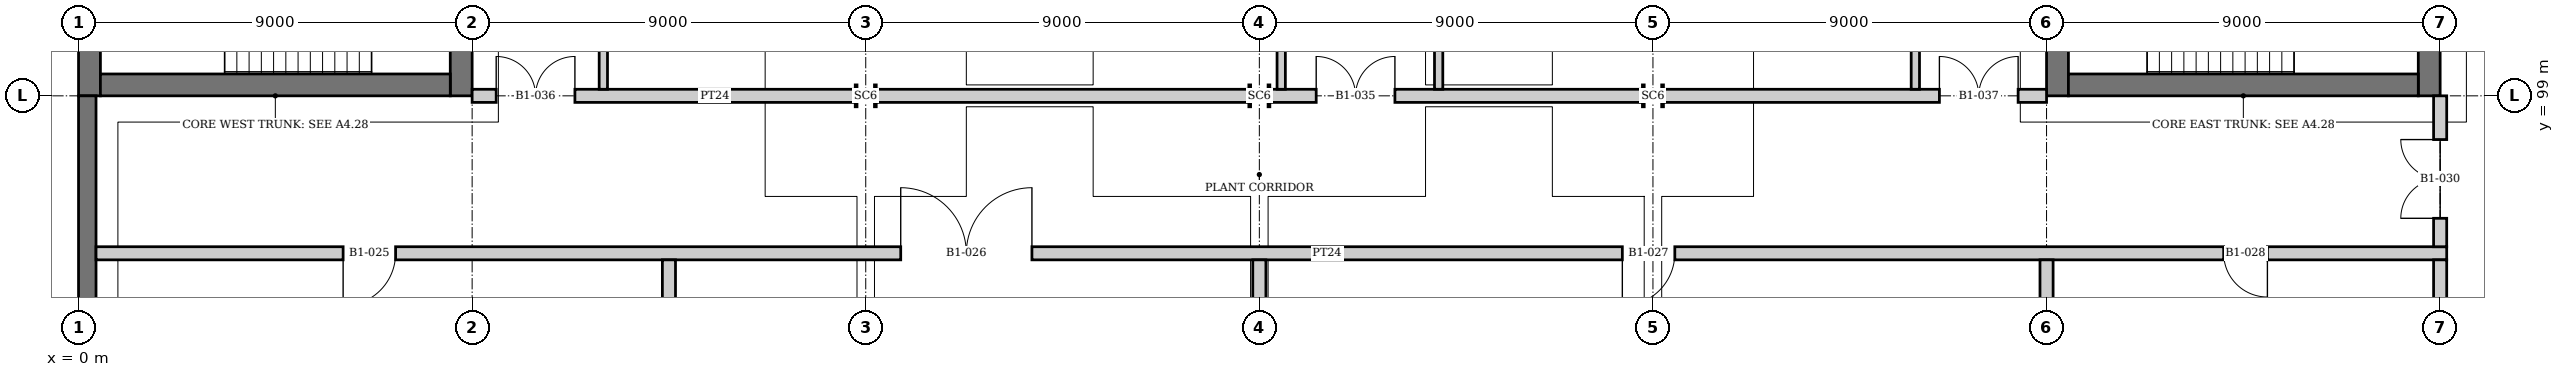
"""IFC4 building model, lengths in metres.
Left out: names, types, materials, properties, quantities, classifications, styles, units other than length and angle.
Written with IfcOpenShell. Run it as: python <this file> out.ifc"""

import sys

from ifc_helpers import new_model, si_unit, direction, frame, frame_2d, origin, origin_2d, place, context, subcontext, project, spatial, rectangle, i_section, extrude, element, fill, save


model = new_model("IFC4")
c1 = context("Model", 3, precision=1e-05, world=origin(), true_north=direction((0.0, 1.0)))
c2 = subcontext(c1, "Body", "Model", "MODEL_VIEW")
j1 = project(units=[si_unit("LENGTHUNIT", "METRE"), si_unit("PLANEANGLEUNIT", "RADIAN")], contexts=[c1])
p1 = place(None, origin())
s1 = spatial("IfcSite", under=j1, at=p1, CompositionType="ELEMENT")
p2 = place(p1, origin())
s2 = spatial("IfcBuilding", under=s1, at=p2, CompositionType="ELEMENT")
p3 = place(p2, frame((0.0, 0.0, -4.5)))
s3 = spatial("IfcBuildingStorey", under=s2, at=p3, CompositionType="ELEMENT", Elevation=-4.5)
for number, where, z_axis, x_axis in (
    (1, (18.0, 99.0, 0.0), (0.0, 0.0, 1.0), (0.0, 1.0, 0.0)),
    (2, (27.0, 99.0, 0.0), (0.0, 0.0, 1.0), (0.0, 1.0, 0.0)),
    (3, (36.0, 99.0, 0.0), (0.0, 0.0, 1.0), (0.0, 1.0, 0.0)),
):
    element("IfcColumn", number, at=place(p3, frame(where, z_axis=z_axis, x_axis=x_axis)), inside=s3, PredefinedType="COLUMN", context=c2, shape_type="SweptSolid", body=[
        extrude(i_section(OverallWidth=0.5, OverallDepth=0.48, WebThickness=0.04, FlangeThickness=0.04, at=origin_2d()), origin(), (0.0, 0.0, 1.0), 4.5),
    ])
p4 = place(p3, frame((0.25, 99.0, 0.0), z_axis=(0.0, 0.0, 1.0), x_axis=(0.0, 1.0, 0.0)))
e4 = element("IfcWall", 4, at=p4, inside=s3, PredefinedType="SHEAR", context=c2, shape_type="SweptSolid", body=[
    extrude(rectangle(XDim=18.0, YDim=0.5, at=frame_2d((9.0, 0.0))), origin(), (0.0, 0.0, 1.0), 4.5),
])
p5 = place(p3, frame((8.75, 99.0, 0.0), z_axis=(0.0, 0.0, 1.0), x_axis=(0.0, 1.0, 0.0)))
e5 = element("IfcWall", 5, at=p5, inside=s3, PredefinedType="SHEAR", context=c2, shape_type="SweptSolid", body=[
    extrude(rectangle(XDim=18.0, YDim=0.5, at=frame_2d((9.0, 0.0))), origin(), (0.0, 0.0, 1.0), 4.5),
])
p6 = place(p5, frame((1.5, 0.0, 0.0)))
e6 = element("IfcOpeningElement", 6, at=p6, cuts=e5, PredefinedType="OPENING", context=c2, shape_type="SweptSolid", body=[
    extrude(rectangle(XDim=1.8, YDim=2.1, at=frame_2d((0.9, 1.05))), frame((0.0, 0.26, 0.0), z_axis=(0.0, -1.0, 0.0), x_axis=(1.0, 0.0, 0.0)), (0.0, 0.0, 1.0), 0.52),
])
p7 = place(p5, frame((14.7, 0.0, 0.0)))
e7 = element("IfcOpeningElement", 7, at=p7, cuts=e5, PredefinedType="OPENING", context=c2, shape_type="SweptSolid", body=[
    extrude(rectangle(XDim=1.8, YDim=2.1, at=frame_2d((0.9, 1.05))), frame((0.0, 0.26, 0.0), z_axis=(0.0, -1.0, 0.0), x_axis=(1.0, 0.0, 0.0)), (0.0, 0.0, 1.0), 0.52),
])
p8 = place(p5, frame((7.5, 0.0, 0.0)))
e8 = element("IfcOpeningElement", 8, at=p8, cuts=e5, PredefinedType="OPENING", context=c2, shape_type="SweptSolid", body=[
    extrude(rectangle(XDim=1.8, YDim=2.1, at=frame_2d((0.9, 1.05))), frame((0.0, 0.26, 0.0), z_axis=(0.0, -1.0, 0.0), x_axis=(1.0, 0.0, 0.0)), (0.0, 0.0, 1.0), 0.52),
])
p9 = place(p3, frame((0.5, 99.25, 0.0), z_axis=(0.0, 0.0, 1.0), x_axis=(1.0, 0.0, 0.0)))
e9 = element("IfcWall", 9, at=p9, inside=s3, PredefinedType="SHEAR", context=c2, shape_type="SweptSolid", body=[
    extrude(rectangle(XDim=8.0, YDim=0.5, at=frame_2d((4.0, 0.0))), origin(), (0.0, 0.0, 1.0), 4.5),
])
p10 = place(p3, frame((45.25, 99.0, 0.0), z_axis=(0.0, 0.0, 1.0), x_axis=(0.0, 1.0, 0.0)))
e10 = element("IfcWall", 10, at=p10, inside=s3, PredefinedType="SHEAR", context=c2, shape_type="SweptSolid", body=[
    extrude(rectangle(XDim=18.0, YDim=0.5, at=frame_2d((9.0, 0.0))), origin(), (0.0, 0.0, 1.0), 4.5),
])
p11 = place(p10, frame((1.5, 0.0, 0.0)))
e11 = element("IfcOpeningElement", 11, at=p11, cuts=e10, PredefinedType="OPENING", context=c2, shape_type="SweptSolid", body=[
    extrude(rectangle(XDim=1.8, YDim=2.1, at=frame_2d((0.9, 1.05))), frame((0.0, 0.26, 0.0), z_axis=(0.0, -1.0, 0.0), x_axis=(1.0, 0.0, 0.0)), (0.0, 0.0, 1.0), 0.52),
])
p12 = place(p10, frame((14.7, 0.0, 0.0)))
e12 = element("IfcOpeningElement", 12, at=p12, cuts=e10, PredefinedType="OPENING", context=c2, shape_type="SweptSolid", body=[
    extrude(rectangle(XDim=1.8, YDim=2.1, at=frame_2d((0.9, 1.05))), frame((0.0, 0.26, 0.0), z_axis=(0.0, -1.0, 0.0), x_axis=(1.0, 0.0, 0.0)), (0.0, 0.0, 1.0), 0.52),
])
p13 = place(p10, frame((7.5, 0.0, 0.0)))
e13 = element("IfcOpeningElement", 13, at=p13, cuts=e10, PredefinedType="OPENING", context=c2, shape_type="SweptSolid", body=[
    extrude(rectangle(XDim=1.8, YDim=2.1, at=frame_2d((0.9, 1.05))), frame((0.0, 0.26, 0.0), z_axis=(0.0, -1.0, 0.0), x_axis=(1.0, 0.0, 0.0)), (0.0, 0.0, 1.0), 0.52),
])
p14 = place(p3, frame((53.75, 99.0, 0.0), z_axis=(0.0, 0.0, 1.0), x_axis=(0.0, 1.0, 0.0)))
e14 = element("IfcWall", 14, at=p14, inside=s3, PredefinedType="SHEAR", context=c2, shape_type="SweptSolid", body=[
    extrude(rectangle(XDim=18.0, YDim=0.5, at=frame_2d((9.0, 0.0))), origin(), (0.0, 0.0, 1.0), 4.5),
])
p15 = place(p3, frame((45.5, 99.25, 0.0), z_axis=(0.0, 0.0, 1.0), x_axis=(1.0, 0.0, 0.0)))
e15 = element("IfcWall", 15, at=p15, inside=s3, PredefinedType="SHEAR", context=c2, shape_type="SweptSolid", body=[
    extrude(rectangle(XDim=8.0, YDim=0.5, at=frame_2d((4.0, 0.0))), origin(), (0.0, 0.0, 1.0), 4.5),
])
p16 = place(p3, frame((0.2, 90.008, 0.0), z_axis=(0.0, 0.0, 1.0), x_axis=(0.0, 1.0, 0.0)))
e16 = element("IfcWall", 16, at=p16, inside=s3, PredefinedType="SOLIDWALL", context=c2, shape_type="SweptSolid", body=[
    extrude(rectangle(XDim=8.992, YDim=0.4, at=frame_2d((4.496, 0.0))), origin(), (0.0, 0.0, 1.0), 4.5),
])
p17 = place(p3, frame((0.4, 95.4, 0.0), z_axis=(0.0, 0.0, 1.0), x_axis=(1.0, 0.0, 0.0)))
e17 = element("IfcWall", 17, at=p17, inside=s3, PredefinedType="PARTITIONING", context=c2, shape_type="SweptSolid", body=[
    extrude(rectangle(XDim=53.75, YDim=0.3, at=frame_2d((26.875, 0.0))), origin(), (0.0, 0.0, 1.0), 3.79),
])
p18 = place(p17, frame((5.65, 0.0, 0.0)))
e18 = element("IfcOpeningElement", 18, at=p18, cuts=e17, PredefinedType="OPENING", context=c2, shape_type="SweptSolid", body=[
    extrude(rectangle(XDim=1.2, YDim=2.4, at=frame_2d((0.6, 1.2))), frame((0.0, 0.16, 0.0), z_axis=(0.0, -1.0, 0.0), x_axis=(1.0, 0.0, 0.0)), (0.0, 0.0, 1.0), 0.32),
])
p19 = place(p17, frame((18.4, 0.0, 0.0)))
e19 = element("IfcOpeningElement", 19, at=p19, cuts=e17, PredefinedType="OPENING", context=c2, shape_type="SweptSolid", body=[
    extrude(rectangle(XDim=3.0, YDim=2.4, at=frame_2d((1.5, 1.2))), frame((0.0, 0.16, 0.0), z_axis=(0.0, -1.0, 0.0), x_axis=(1.0, 0.0, 0.0)), (0.0, 0.0, 1.0), 0.32),
])
p20 = place(p17, frame((34.9, 0.0, 0.0)))
e20 = element("IfcOpeningElement", 20, at=p20, cuts=e17, PredefinedType="OPENING", context=c2, shape_type="SweptSolid", body=[
    extrude(rectangle(XDim=1.2, YDim=2.4, at=frame_2d((0.6, 1.2))), frame((0.0, 0.16, 0.0), z_axis=(0.0, -1.0, 0.0), x_axis=(1.0, 0.0, 0.0)), (0.0, 0.0, 1.0), 0.32),
])
p21 = place(p17, frame((48.65, 0.0, 0.0)))
e21 = element("IfcOpeningElement", 21, at=p21, cuts=e17, PredefinedType="OPENING", context=c2, shape_type="SweptSolid", body=[
    extrude(rectangle(XDim=1.0, YDim=2.4, at=frame_2d((0.5, 1.2))), frame((0.0, 0.16, 0.0), z_axis=(0.0, -1.0, 0.0), x_axis=(1.0, 0.0, 0.0)), (0.0, 0.0, 1.0), 0.32),
])
p22 = place(p3, frame((9.0, 99.0, 0.0), z_axis=(0.0, 0.0, 1.0), x_axis=(1.0, 0.0, 0.0)))
e22 = element("IfcWall", 22, at=p22, inside=s3, PredefinedType="PARTITIONING", context=c2, shape_type="SweptSolid", body=[
    extrude(rectangle(XDim=8.75, YDim=0.3, at=frame_2d((4.375, 0.0))), origin(), (0.0, 0.0, 1.0), 3.34),
])
p23 = place(p22, frame((0.55, 0.0, 0.0)))
e23 = element("IfcOpeningElement", 23, at=p23, cuts=e22, PredefinedType="OPENING", context=c2, shape_type="SweptSolid", body=[
    extrude(rectangle(XDim=1.8, YDim=2.1, at=frame_2d((0.9, 1.05))), frame((0.0, 0.16, 0.0), z_axis=(0.0, -1.0, 0.0), x_axis=(1.0, 0.0, 0.0)), (0.0, 0.0, 1.0), 0.32),
])
p24 = place(p3, frame((18.25, 99.0, 0.0), z_axis=(0.0, 0.0, 1.0), x_axis=(1.0, 0.0, 0.0)))
e24 = element("IfcWall", 24, at=p24, inside=s3, PredefinedType="PARTITIONING", context=c2, shape_type="SweptSolid", body=[
    extrude(rectangle(XDim=8.5, YDim=0.3, at=frame_2d((4.25, 0.0))), origin(), (0.0, 0.0, 1.0), 3.34),
])
p25 = place(p3, frame((27.25, 99.0, 0.0), z_axis=(0.0, 0.0, 1.0), x_axis=(1.0, 0.0, 0.0)))
e25 = element("IfcWall", 25, at=p25, inside=s3, PredefinedType="PARTITIONING", context=c2, shape_type="SweptSolid", body=[
    extrude(rectangle(XDim=8.5, YDim=0.3, at=frame_2d((4.25, 0.0))), origin(), (0.0, 0.0, 1.0), 3.34),
])
p26 = place(p25, frame((1.05, 0.0, 0.0)))
e26 = element("IfcOpeningElement", 26, at=p26, cuts=e25, PredefinedType="OPENING", context=c2, shape_type="SweptSolid", body=[
    extrude(rectangle(XDim=1.8, YDim=2.1, at=frame_2d((0.9, 1.05))), frame((0.0, 0.16, 0.0), z_axis=(0.0, -1.0, 0.0), x_axis=(1.0, 0.0, 0.0)), (0.0, 0.0, 1.0), 0.32),
])
p27 = place(p3, frame((36.25, 99.0, 0.0), z_axis=(0.0, 0.0, 1.0), x_axis=(1.0, 0.0, 0.0)))
e27 = element("IfcWall", 27, at=p27, inside=s3, PredefinedType="PARTITIONING", context=c2, shape_type="SweptSolid", body=[
    extrude(rectangle(XDim=8.75, YDim=0.3, at=frame_2d((4.375, 0.0))), origin(), (0.0, 0.0, 1.0), 3.34),
])
p28 = place(p27, frame((6.3, 0.0, 0.0)))
e28 = element("IfcOpeningElement", 28, at=p28, cuts=e27, PredefinedType="OPENING", context=c2, shape_type="SweptSolid", body=[
    extrude(rectangle(XDim=1.8, YDim=2.1, at=frame_2d((0.9, 1.05))), frame((0.0, 0.16, 0.0), z_axis=(0.0, -1.0, 0.0), x_axis=(1.0, 0.0, 0.0)), (0.0, 0.0, 1.0), 0.32),
])
p29 = place(p3, frame((12.0, 99.15, 0.0), z_axis=(0.0, 0.0, 1.0), x_axis=(0.0, 1.0, 0.0)))
e29 = element("IfcWall", 29, at=p29, inside=s3, PredefinedType="PARTITIONING", context=c2, shape_type="SweptSolid", body=[
    extrude(rectangle(XDim=8.77, YDim=0.19, at=frame_2d((4.385, 0.0))), origin(), (0.0, 0.0, 1.0), 3.34),
])
p30 = place(p3, frame((13.5, 81.0, 0.0), z_axis=(0.0, 0.0, 1.0), x_axis=(0.0, 1.0, 0.0)))
e30 = element("IfcWall", 30, at=p30, inside=s3, PredefinedType="PARTITIONING", context=c2, shape_type="SweptSolid", body=[
    extrude(rectangle(XDim=14.25, YDim=0.3, at=frame_2d((7.125, 0.0))), origin(), (0.0, 0.0, 1.0), 3.638),
])
p31 = place(p3, frame((27.0, 90.164, 0.0), z_axis=(0.0, 0.0, 1.0), x_axis=(0.0, 1.0, 0.0)))
e31 = element("IfcWall", 31, at=p31, inside=s3, PredefinedType="PARTITIONING", context=c2, shape_type="SweptSolid", body=[
    extrude(rectangle(XDim=5.086, YDim=0.3, at=frame_2d((2.543, 0.0))), origin(), (0.0, 0.0, 1.0), 3.79),
])
p32 = place(p3, frame((27.5, 99.15, 0.0), z_axis=(0.0, 0.0, 1.0), x_axis=(0.0, 1.0, 0.0)))
e32 = element("IfcWall", 32, at=p32, inside=s3, PredefinedType="PARTITIONING", context=c2, shape_type="SweptSolid", body=[
    extrude(rectangle(XDim=8.77, YDim=0.19, at=frame_2d((4.385, 0.0))), origin(), (0.0, 0.0, 1.0), 3.34),
])
p33 = place(p32, frame((3.65, 0.0, 0.0)))
e33 = element("IfcOpeningElement", 33, at=p33, cuts=e32, PredefinedType="OPENING", context=c2, shape_type="SweptSolid", body=[
    extrude(rectangle(XDim=1.5, YDim=2.1, at=frame_2d((0.75, 1.05))), frame((0.0, 0.105, 0.0), z_axis=(0.0, -1.0, 0.0), x_axis=(1.0, 0.0, 0.0)), (0.0, 0.0, 1.0), 0.21),
])
p34 = place(p3, frame((31.1, 99.15, 0.0), z_axis=(0.0, 0.0, 1.0), x_axis=(0.0, 1.0, 0.0)))
e34 = element("IfcWall", 34, at=p34, inside=s3, PredefinedType="PARTITIONING", context=c2, shape_type="SweptSolid", body=[
    extrude(rectangle(XDim=8.77, YDim=0.19, at=frame_2d((4.385, 0.0))), origin(), (0.0, 0.0, 1.0), 3.34),
])
p35 = place(p34, frame((3.65, 0.0, 0.0)))
e35 = element("IfcOpeningElement", 35, at=p35, cuts=e34, PredefinedType="OPENING", context=c2, shape_type="SweptSolid", body=[
    extrude(rectangle(XDim=1.5, YDim=2.1, at=frame_2d((0.75, 1.05))), frame((0.0, 0.105, 0.0), z_axis=(0.0, -1.0, 0.0), x_axis=(1.0, 0.0, 0.0)), (0.0, 0.0, 1.0), 0.21),
])
p36 = place(p3, frame((42.0, 99.15, 0.0), z_axis=(0.0, 0.0, 1.0), x_axis=(0.0, 1.0, 0.0)))
e36 = element("IfcWall", 36, at=p36, inside=s3, PredefinedType="PARTITIONING", context=c2, shape_type="SweptSolid", body=[
    extrude(rectangle(XDim=8.77, YDim=0.19, at=frame_2d((4.385, 0.0))), origin(), (0.0, 0.0, 1.0), 3.34),
])
for number, where, z_axis, x_axis in (
    (37, (45.0, 90.164, 0.0), (0.0, 0.0, 1.0), (0.0, 1.0, 0.0)),
    (38, (54.0, 90.164, 0.0), (0.0, 0.0, 1.0), (0.0, 1.0, 0.0)),
):
    element("IfcWall", number, at=place(p3, frame(where, z_axis=z_axis, x_axis=x_axis)), inside=s3, PredefinedType="PARTITIONING", context=c2, shape_type="SweptSolid", body=[
        extrude(rectangle(XDim=5.086, YDim=0.3, at=frame_2d((2.543, 0.0))), origin(), (0.0, 0.0, 1.0), 3.79),
    ])
p37 = place(p3, frame((54.0, 95.55, 0.0), z_axis=(0.0, 0.0, 1.0), x_axis=(0.0, 1.0, 0.0)))
e39 = element("IfcWall", 39, at=p37, inside=s3, PredefinedType="PARTITIONING", context=c2, shape_type="SweptSolid", body=[
    extrude(rectangle(XDim=3.45, YDim=0.3, at=frame_2d((1.725, 0.0))), origin(), (0.0, 0.0, 1.0), 3.638),
])
p38 = place(p37, frame((0.65, 0.0, 0.0)))
e40 = element("IfcOpeningElement", 40, at=p38, cuts=e39, PredefinedType="OPENING", context=c2, shape_type="SweptSolid", body=[
    extrude(rectangle(XDim=1.8, YDim=2.1, at=frame_2d((0.9, 1.05))), frame((0.0, 0.16, 0.0), z_axis=(0.0, -1.0, 0.0), x_axis=(1.0, 0.0, 0.0)), (0.0, 0.0, 1.0), 0.32),
])
p39 = place(p18, frame((1.2, 0.0, 0.0), z_axis=(0.0, 0.0, 1.0), x_axis=(-1.0, 0.0, 0.0)))
e41 = element("IfcDoor", 41, at=p39, inside=s3, OperationType="SINGLE_SWING_RIGHT", PredefinedType="DOOR", context=c2, shape_type="SweptSolid", body=[
    extrude(rectangle(XDim=1.2, YDim=2.4, at=frame_2d((0.6, 1.2))), frame((0.0, 0.025, 0.0), z_axis=(0.0, -1.0, 0.0), x_axis=(1.0, 0.0, 0.0)), (0.0, 0.0, 1.0), 0.05),
])
fill(e18, e41)
p40 = place(p19, origin())
e42 = element("IfcDoor", 42, at=p40, inside=s3, OperationType="DOUBLE_DOOR_SINGLE_SWING", PredefinedType="DOOR", context=c2, shape_type="SweptSolid", body=[
    extrude(rectangle(XDim=3.0, YDim=2.4, at=frame_2d((1.5, 1.2))), frame((0.0, 0.025, 0.0), z_axis=(0.0, -1.0, 0.0), x_axis=(1.0, 0.0, 0.0)), (0.0, 0.0, 1.0), 0.05),
])
fill(e19, e42)
p41 = place(p20, frame((1.2, 0.0, 0.0), z_axis=(0.0, 0.0, 1.0), x_axis=(-1.0, 0.0, 0.0)))
e43 = element("IfcDoor", 43, at=p41, inside=s3, OperationType="SINGLE_SWING_RIGHT", PredefinedType="DOOR", context=c2, shape_type="SweptSolid", body=[
    extrude(rectangle(XDim=1.2, YDim=2.4, at=frame_2d((0.6, 1.2))), frame((0.0, 0.025, 0.0), z_axis=(0.0, -1.0, 0.0), x_axis=(1.0, 0.0, 0.0)), (0.0, 0.0, 1.0), 0.05),
])
fill(e20, e43)
p42 = place(p21, frame((1.0, 0.0, 0.0), z_axis=(0.0, 0.0, 1.0), x_axis=(-1.0, 0.0, 0.0)))
e44 = element("IfcDoor", 44, at=p42, inside=s3, OperationType="SINGLE_SWING_LEFT", PredefinedType="DOOR", context=c2, shape_type="SweptSolid", body=[
    extrude(rectangle(XDim=1.0, YDim=2.4, at=frame_2d((0.5, 1.2))), frame((0.0, 0.025, 0.0), z_axis=(0.0, -1.0, 0.0), x_axis=(1.0, 0.0, 0.0)), (0.0, 0.0, 1.0), 0.05),
])
fill(e21, e44)
p43 = place(p38, origin())
e45 = element("IfcDoor", 45, at=p43, inside=s3, OperationType="DOUBLE_DOOR_SINGLE_SWING", PredefinedType="DOOR", context=c2, shape_type="SweptSolid", body=[
    extrude(rectangle(XDim=1.8, YDim=2.1, at=frame_2d((0.9, 1.05))), frame((0.0, 0.025, 0.0), z_axis=(0.0, -1.0, 0.0), x_axis=(1.0, 0.0, 0.0)), (0.0, 0.0, 1.0), 0.05),
])
fill(e40, e45)
p44 = place(p26, origin())
e46 = element("IfcDoor", 46, at=p44, inside=s3, OperationType="DOUBLE_DOOR_SINGLE_SWING", PredefinedType="DOOR", context=c2, shape_type="SweptSolid", body=[
    extrude(rectangle(XDim=1.8, YDim=2.1, at=frame_2d((0.9, 1.05))), frame((0.0, 0.025, 0.0), z_axis=(0.0, -1.0, 0.0), x_axis=(1.0, 0.0, 0.0)), (0.0, 0.0, 1.0), 0.05),
])
fill(e26, e46)
p45 = place(p23, origin())
e47 = element("IfcDoor", 47, at=p45, inside=s3, OperationType="DOUBLE_DOOR_SINGLE_SWING", PredefinedType="DOOR", context=c2, shape_type="SweptSolid", body=[
    extrude(rectangle(XDim=1.8, YDim=2.1, at=frame_2d((0.9, 1.05))), frame((0.0, 0.025, 0.0), z_axis=(0.0, -1.0, 0.0), x_axis=(1.0, 0.0, 0.0)), (0.0, 0.0, 1.0), 0.05),
])
fill(e23, e47)
p46 = place(p28, origin())
e48 = element("IfcDoor", 48, at=p46, inside=s3, OperationType="DOUBLE_DOOR_SINGLE_SWING", PredefinedType="DOOR", context=c2, shape_type="SweptSolid", body=[
    extrude(rectangle(XDim=1.8, YDim=2.1, at=frame_2d((0.9, 1.05))), frame((0.0, 0.025, 0.0), z_axis=(0.0, -1.0, 0.0), x_axis=(1.0, 0.0, 0.0)), (0.0, 0.0, 1.0), 0.05),
])
fill(e28, e48)
save(model, sys.argv[1])
